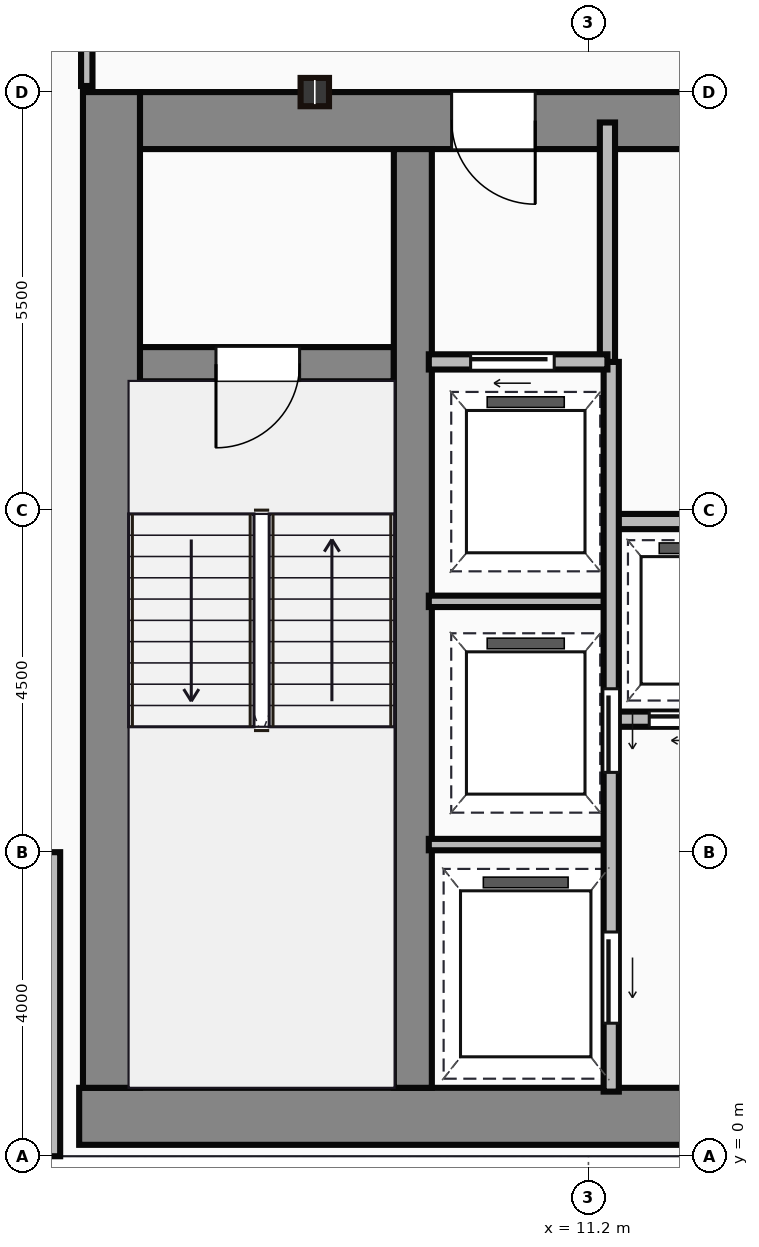
"""IFC4 building model, lengths in metres.
Left out: names, types, materials, properties, quantities, classifications, styles, units other than length and angle.
Written with IfcOpenShell. Run it as: python <this file> out.ifc"""

import sys

from ifc_helpers import new_model, si_unit, direction, frame, frame_2d, origin, origin_2d, place, context, subcontext, project, spatial, rectangle, i_section, extrude, source, transform, mapped, element, fill, save


model = new_model("IFC4")
c1 = context("Model", 3, precision=1e-05, world=origin(), true_north=direction((0.0, 1.0)))
c2 = subcontext(c1, "Body", "Model", "MODEL_VIEW")
j1 = project(units=[si_unit("LENGTHUNIT", "METRE"), si_unit("PLANEANGLEUNIT", "RADIAN")], contexts=[c1])
p1 = place(None, origin())
s1 = spatial("IfcSite", under=j1, at=p1, CompositionType="ELEMENT")
p2 = place(p1, origin())
s2 = spatial("IfcBuilding", under=s1, at=p2, CompositionType="ELEMENT")
p3 = place(p2, frame((0.0, 0.0, 147.9)))
s3 = spatial("IfcBuildingStorey", under=s2, at=p3, CompositionType="ELEMENT", Elevation=147.9)
m1 = source(origin(), c2, "Body", "SweptSolid", [
    extrude(rectangle(XDim=29.5, YDim=0.75, at=frame_2d((14.75, 0.0))), origin(), (0.0, 0.0, 1.0), 3.65),
])
p4 = place(p3, frame((4.5, 0.525, 0.0), z_axis=(0.0, 0.0, 1.0), x_axis=(1.0, 0.0, 0.0)))
e1 = element("IfcWall", 1, at=p4, inside=s3, PredefinedType="SHEAR", context=c2, shape_type="MappedRepresentation", body=[
    mapped(m1, transform((0.0, 0.0, 0.0))),
])
m2 = source(origin(), c2, "Body", "SweptSolid", [
    extrude(rectangle(XDim=13.1, YDim=0.75, at=frame_2d((6.55, 0.0))), origin(), (0.0, 0.0, 1.0), 3.65),
])
p5 = place(p3, frame((4.925, 0.9, 0.0), z_axis=(0.0, 0.0, 1.0), x_axis=(0.0, 1.0, 0.0)))
e2 = element("IfcWall", 2, at=p5, inside=s3, PredefinedType="SHEAR", context=c2, shape_type="MappedRepresentation", body=[
    mapped(m2, transform((0.0, 0.0, 0.0))),
])
m3 = source(origin(), c2, "Body", "SweptSolid", [
    extrude(rectangle(XDim=9.1, YDim=0.75, at=frame_2d((4.55, 0.0))), origin(), (0.0, 0.0, 1.0), 3.65),
])
p6 = place(p3, frame((5.3, 13.625, 0.0), z_axis=(0.0, 0.0, 1.0), x_axis=(1.0, 0.0, 0.0)))
e3 = element("IfcWall", 3, at=p6, inside=s3, PredefinedType="SHEAR", context=c2, shape_type="MappedRepresentation", body=[
    mapped(m3, transform((0.0, 0.0, 0.0))),
])
p7 = place(p6, frame((4.1, 0.0, 0.0)))
e4 = element("IfcOpeningElement", 4, at=p7, cuts=e3, PredefinedType="OPENING", context=c2, shape_type="SweptSolid", body=[
    extrude(rectangle(XDim=1.1, YDim=2.15, at=frame_2d((0.55, 1.075))), frame((0.0, 0.385, 0.0), z_axis=(0.0, -1.0, 0.0), x_axis=(1.0, 0.0, 0.0)), (0.0, 0.0, 1.0), 0.77),
])
m4 = source(origin(), c2, "Body", "SweptSolid", [
    extrude(rectangle(XDim=12.35, YDim=0.5, at=frame_2d((6.175, 0.0))), origin(), (0.0, 0.0, 1.0), 3.65),
])
p8 = place(p3, frame((8.89, 0.9, 0.0), z_axis=(0.0, 0.0, 1.0), x_axis=(0.0, 1.0, 0.0)))
e5 = element("IfcWall", 5, at=p8, inside=s3, PredefinedType="SHEAR", context=c2, shape_type="MappedRepresentation", body=[
    mapped(m4, transform((0.0, 0.0, 0.0))),
])
m5 = source(origin(), c2, "Body", "SweptSolid", [
    extrude(rectangle(XDim=3.39, YDim=0.45, at=frame_2d((1.695, 0.0))), origin(), (0.0, 0.0, 1.0), 3.65),
])
p9 = place(p3, frame((5.25, 10.42, 0.0), z_axis=(0.0, 0.0, 1.0), x_axis=(1.0, 0.0, 0.0)))
e6 = element("IfcWall", 6, at=p9, inside=s3, PredefinedType="SHEAR", context=c2, shape_type="MappedRepresentation", body=[
    mapped(m5, transform((0.0, 0.0, 0.0))),
])
p10 = place(p9, frame((1.05, 0.0, 0.0)))
e7 = element("IfcOpeningElement", 7, at=p10, cuts=e6, PredefinedType="OPENING", context=c2, shape_type="SweptSolid", body=[
    extrude(rectangle(XDim=1.1, YDim=2.15, at=frame_2d((0.55, 1.075))), frame((0.0, 0.235, 0.0), z_axis=(0.0, -1.0, 0.0), x_axis=(1.0, 0.0, 0.0)), (0.0, 0.0, 1.0), 0.47),
])
m6 = source(origin(), c2, "Body", "SweptSolid", [
    extrude(i_section(OverallWidth=0.374, OverallDepth=0.372, WebThickness=0.016, FlangeThickness=0.026, at=origin_2d()), origin(), (0.0, 0.0, 1.0), 3.65),
])
p11 = place(p3, frame((7.6, 14.0, 0.0), z_axis=(0.0, 0.0, 1.0), x_axis=(1.0, 0.0, 0.0)))
e8 = element("IfcColumn", 8, at=p11, inside=s3, PredefinedType="COLUMN", context=c2, shape_type="MappedRepresentation", body=[
    mapped(m6, transform((0.0, 0.0, 0.0))),
])
m7 = source(origin(), c2, "Body", "SweptSolid", [
    extrude(rectangle(XDim=4.0, YDim=0.25, at=frame_2d((2.0, 0.0))), origin(), (0.0, 0.0, 1.0), 3.4),
])
p12 = place(p3, frame((4.125, 4.0, 0.0), z_axis=(0.0, 0.0, 1.0), x_axis=(0.0, -1.0, 0.0)))
e9 = element("IfcWall", 9, at=p12, inside=s3, PredefinedType="STANDARD", context=c2, shape_type="MappedRepresentation", body=[
    mapped(m7, transform((0.0, 0.0, 0.0))),
])
m8 = source(origin(), c2, "Body", "SweptSolid", [
    extrude(rectangle(XDim=3.18, YDim=0.2, at=frame_2d((1.59, 0.0))), origin(), (0.0, 0.0, 1.0), 3.4),
])
p13 = place(p3, frame((11.45, 10.42, 0.0), z_axis=(0.0, 0.0, 1.0), x_axis=(0.0, 1.0, 0.0)))
e10 = element("IfcWall", 10, at=p13, inside=s3, PredefinedType="PARTITIONING", context=c2, shape_type="MappedRepresentation", body=[
    mapped(m8, transform((0.0, 0.0, 0.0))),
])
m9 = source(origin(), c2, "Body", "SweptSolid", [
    extrude(rectangle(XDim=2.35, YDim=0.2, at=frame_2d((1.175, 0.0))), origin(), (0.0, 0.0, 1.0), 3.4),
])
p14 = place(p3, frame((9.1, 10.45, 0.0), z_axis=(0.0, 0.0, 1.0), x_axis=(1.0, 0.0, 0.0)))
e11 = element("IfcWall", 11, at=p14, inside=s3, PredefinedType="PARTITIONING", context=c2, shape_type="MappedRepresentation", body=[
    mapped(m9, transform((0.0, 0.0, 0.0))),
])
p15 = place(p14, frame((0.55, 0.0, 0.0)))
e12 = element("IfcOpeningElement", 12, at=p15, cuts=e11, PredefinedType="OPENING", context=c2, shape_type="SweptSolid", body=[
    extrude(rectangle(XDim=1.1, YDim=2.15, at=frame_2d((0.55, 1.075))), frame((0.0, 0.11, 0.0), z_axis=(0.0, -1.0, 0.0), x_axis=(1.0, 0.0, 0.0)), (0.0, 0.0, 1.0), 0.22),
])
m10 = source(origin(), c2, "Body", "SweptSolid", [
    extrude(rectangle(XDim=9.6, YDim=0.2, at=frame_2d((4.8, 0.0))), origin(), (0.0, 0.0, 1.0), 3.4),
])
p16 = place(p3, frame((11.5, 0.85, 0.0), z_axis=(0.0, 0.0, 1.0), x_axis=(0.0, 1.0, 0.0)))
e13 = element("IfcWall", 13, at=p16, inside=s3, PredefinedType="PARTITIONING", context=c2, shape_type="MappedRepresentation", body=[
    mapped(m10, transform((0.0, 0.0, 0.0))),
])
p17 = place(p16, frame((4.2, 0.0, 0.0)))
e14 = element("IfcOpeningElement", 14, at=p17, cuts=e13, PredefinedType="OPENING", context=c2, shape_type="SweptSolid", body=[
    extrude(rectangle(XDim=1.1, YDim=2.15, at=frame_2d((0.55, 1.075))), frame((0.0, 0.11, 0.0), z_axis=(0.0, -1.0, 0.0), x_axis=(1.0, 0.0, 0.0)), (0.0, 0.0, 1.0), 0.22),
])
p18 = place(p16, frame((0.9, 0.0, 0.0)))
e15 = element("IfcOpeningElement", 15, at=p18, cuts=e13, PredefinedType="OPENING", context=c2, shape_type="SweptSolid", body=[
    extrude(rectangle(XDim=1.2, YDim=2.15, at=frame_2d((0.6, 1.075))), frame((0.0, 0.11, 0.0), z_axis=(0.0, -1.0, 0.0), x_axis=(1.0, 0.0, 0.0)), (0.0, 0.0, 1.0), 0.22),
])
m11 = source(origin(), c2, "Body", "SweptSolid", [
    extrude(rectangle(XDim=2.4, YDim=0.15, at=frame_2d((1.2, 0.0))), origin(), (0.0, 0.0, 1.0), 3.4),
])
for number, where, z_axis, x_axis in (
    (16, (9.1, 4.1, 0.0), (0.0, 0.0, 1.0), (1.0, 0.0, 0.0)),
    (17, (9.1, 7.3, 0.0), (0.0, 0.0, 1.0), (1.0, 0.0, 0.0)),
):
    element("IfcWall", number, at=place(p3, frame(where, z_axis=z_axis, x_axis=x_axis)), inside=s3, PredefinedType="PARTITIONING", context=c2, shape_type="MappedRepresentation", body=[
        mapped(m11, transform((0.0, 0.0, 0.0))),
    ])
m12 = source(origin(), c2, "Body", "SweptSolid", [
    extrude(rectangle(XDim=11.85, YDim=0.2, at=frame_2d((5.925, 0.0))), origin(), (0.0, 0.0, 1.0), 3.4),
])
p19 = place(p3, frame((11.55, 5.75, 0.0), z_axis=(0.0, 0.0, 1.0), x_axis=(1.0, 0.0, 0.0)))
e18 = element("IfcWall", 18, at=p19, inside=s3, PredefinedType="PARTITIONING", context=c2, shape_type="MappedRepresentation", body=[
    mapped(m12, transform((0.0, 0.0, 0.0))),
])
p20 = place(p19, frame((0.45, 0.0, 0.0)))
e19 = element("IfcOpeningElement", 19, at=p20, cuts=e18, PredefinedType="OPENING", context=c2, shape_type="SweptSolid", body=[
    extrude(rectangle(XDim=1.05, YDim=2.15, at=frame_2d((0.525, 1.075))), frame((0.0, 0.11, 0.0), z_axis=(0.0, -1.0, 0.0), x_axis=(1.0, 0.0, 0.0)), (0.0, 0.0, 1.0), 0.22),
])
p21 = place(p19, frame((2.4, 0.0, 0.0)))
e20 = element("IfcOpeningElement", 20, at=p21, cuts=e18, PredefinedType="OPENING", context=c2, shape_type="SweptSolid", body=[
    extrude(rectangle(XDim=1.05, YDim=2.15, at=frame_2d((0.525, 1.075))), frame((0.0, 0.11, 0.0), z_axis=(0.0, -1.0, 0.0), x_axis=(1.0, 0.0, 0.0)), (0.0, 0.0, 1.0), 0.22),
])
p22 = place(p19, frame((4.35, 0.0, 0.0)))
e21 = element("IfcOpeningElement", 21, at=p22, cuts=e18, PredefinedType="OPENING", context=c2, shape_type="SweptSolid", body=[
    extrude(rectangle(XDim=1.05, YDim=2.15, at=frame_2d((0.525, 1.075))), frame((0.0, 0.11, 0.0), z_axis=(0.0, -1.0, 0.0), x_axis=(1.0, 0.0, 0.0)), (0.0, 0.0, 1.0), 0.22),
])
p23 = place(p19, frame((6.3, 0.0, 0.0)))
e22 = element("IfcOpeningElement", 22, at=p23, cuts=e18, PredefinedType="OPENING", context=c2, shape_type="SweptSolid", body=[
    extrude(rectangle(XDim=1.05, YDim=2.15, at=frame_2d((0.525, 1.075))), frame((0.0, 0.11, 0.0), z_axis=(0.0, -1.0, 0.0), x_axis=(1.0, 0.0, 0.0)), (0.0, 0.0, 1.0), 0.22),
])
p24 = place(p19, frame((8.25, 0.0, 0.0)))
e23 = element("IfcOpeningElement", 23, at=p24, cuts=e18, PredefinedType="OPENING", context=c2, shape_type="SweptSolid", body=[
    extrude(rectangle(XDim=1.05, YDim=2.15, at=frame_2d((0.525, 1.075))), frame((0.0, 0.11, 0.0), z_axis=(0.0, -1.0, 0.0), x_axis=(1.0, 0.0, 0.0)), (0.0, 0.0, 1.0), 0.22),
])
p25 = place(p19, frame((10.2, 0.0, 0.0)))
e24 = element("IfcOpeningElement", 24, at=p25, cuts=e18, PredefinedType="OPENING", context=c2, shape_type="SweptSolid", body=[
    extrude(rectangle(XDim=1.05, YDim=2.15, at=frame_2d((0.525, 1.075))), frame((0.0, 0.11, 0.0), z_axis=(0.0, -1.0, 0.0), x_axis=(1.0, 0.0, 0.0)), (0.0, 0.0, 1.0), 0.22),
])
p26 = place(p3, frame((11.55, 8.35, 0.0), z_axis=(0.0, 0.0, 1.0), x_axis=(1.0, 0.0, 0.0)))
e25 = element("IfcWall", 25, at=p26, inside=s3, PredefinedType="PARTITIONING", context=c2, shape_type="MappedRepresentation", body=[
    mapped(m12, transform((0.0, 0.0, 0.0))),
])
m13 = source(origin(), c2, "Body", "SweptSolid", [
    extrude(rectangle(XDim=2.22, YDim=0.15, at=frame_2d((1.11, 0.0))), origin(), (0.0, 0.0, 1.0), 3.4),
])
p27 = place(p3, frame((4.6, 14.08, 0.0), z_axis=(0.0, 0.0, 1.0), x_axis=(0.0, 1.0, 0.0)))
e26 = element("IfcWall", 26, at=p27, inside=s3, PredefinedType="PARTITIONING", context=c2, shape_type="MappedRepresentation", body=[
    mapped(m13, transform((0.0, 0.0, 0.0))),
])
m14 = source(origin(), c2, "Body", "SweptSolid", [
    extrude(rectangle(XDim=1.1, YDim=2.15, at=frame_2d((0.55, 1.075))), frame((0.0, 0.025, 0.0), z_axis=(0.0, -1.0, 0.0), x_axis=(1.0, 0.0, 0.0)), (0.0, 0.0, 1.0), 0.05),
])
p28 = place(p10, frame((1.1, 0.0, 0.0), z_axis=(0.0, 0.0, 1.0), x_axis=(-1.0, 0.0, 0.0)))
e27 = element("IfcDoor", 27, at=p28, inside=s3, OperationType="SINGLE_SWING_LEFT", PredefinedType="DOOR", context=c2, shape_type="MappedRepresentation", body=[
    mapped(m14, transform((0.0, 0.0, 0.0))),
])
fill(e7, e27)
p29 = place(p7, origin())
e28 = element("IfcDoor", 28, at=p29, inside=s3, OperationType="SINGLE_SWING_RIGHT", PredefinedType="DOOR", context=c2, shape_type="MappedRepresentation", body=[
    mapped(m14, transform((0.0, 0.0, 0.0))),
])
fill(e4, e28)
p30 = place(p15, origin())
e29 = element("IfcDoor", 29, at=p30, inside=s3, OperationType="SLIDING_TO_LEFT", PredefinedType="DOOR", context=c2, shape_type="MappedRepresentation", body=[
    mapped(m14, transform((0.0, 0.0, 0.0))),
])
fill(e12, e29)
p31 = place(p17, frame((1.1, 0.0, 0.0), z_axis=(0.0, 0.0, 1.0), x_axis=(-1.0, 0.0, 0.0)))
e30 = element("IfcDoor", 30, at=p31, inside=s3, OperationType="SLIDING_TO_LEFT", PredefinedType="DOOR", context=c2, shape_type="MappedRepresentation", body=[
    mapped(m14, transform((0.0, 0.0, 0.0))),
])
fill(e14, e30)
m15 = source(origin(), c2, "Body", "SweptSolid", [
    extrude(rectangle(XDim=1.2, YDim=2.15, at=frame_2d((0.6, 1.075))), frame((0.0, 0.025, 0.0), z_axis=(0.0, -1.0, 0.0), x_axis=(1.0, 0.0, 0.0)), (0.0, 0.0, 1.0), 0.05),
])
p32 = place(p18, frame((1.2, 0.0, 0.0), z_axis=(0.0, 0.0, 1.0), x_axis=(-1.0, 0.0, 0.0)))
e31 = element("IfcDoor", 31, at=p32, inside=s3, OperationType="SLIDING_TO_LEFT", PredefinedType="DOOR", context=c2, shape_type="MappedRepresentation", body=[
    mapped(m15, transform((0.0, 0.0, 0.0))),
])
fill(e15, e31)
m16 = source(origin(), c2, "Body", "SweptSolid", [
    extrude(rectangle(XDim=1.05, YDim=2.15, at=frame_2d((0.525, 1.075))), frame((0.0, 0.025, 0.0), z_axis=(0.0, -1.0, 0.0), x_axis=(1.0, 0.0, 0.0)), (0.0, 0.0, 1.0), 0.05),
])
p33 = place(p20, frame((1.05, 0.0, 0.0), z_axis=(0.0, 0.0, 1.0), x_axis=(-1.0, 0.0, 0.0)))
e32 = element("IfcDoor", 32, at=p33, inside=s3, OperationType="SLIDING_TO_LEFT", PredefinedType="DOOR", context=c2, shape_type="MappedRepresentation", body=[
    mapped(m16, transform((0.0, 0.0, 0.0))),
])
fill(e19, e32)
save(model, sys.argv[1])
